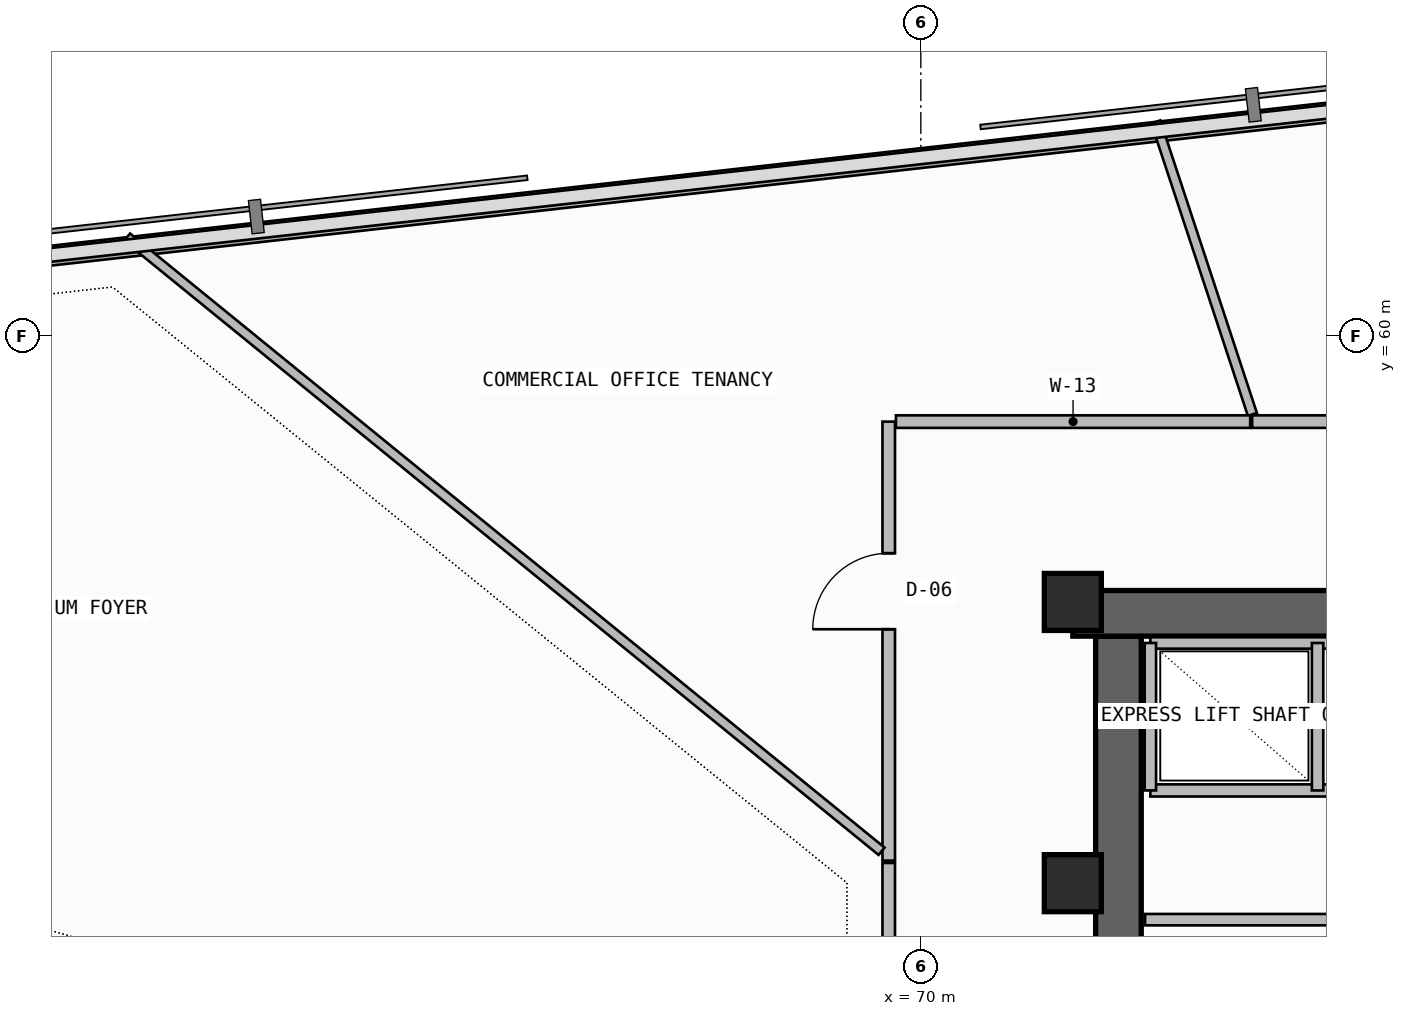
"""IFC4 building model, lengths in metres.
Left out: names, types, materials, properties, quantities, classifications, styles, units other than length and angle.
Written with IfcOpenShell. Run it as: python <this file> out.ifc"""

import sys

from ifc_helpers import new_model, si_unit, direction, frame, frame_2d, origin, origin_2d, place, context, subcontext, project, spatial, rectangle, extrude, element, fill, save


model = new_model("IFC4")
c1 = context("Model", 3, precision=1e-05, world=origin(), true_north=direction((0.0, 1.0)))
c2 = subcontext(c1, "Body", "Model", "MODEL_VIEW")
j1 = project(units=[si_unit("LENGTHUNIT", "METRE"), si_unit("PLANEANGLEUNIT", "RADIAN")], contexts=[c1])
p1 = place(None, origin())
s1 = spatial("IfcSite", under=j1, at=p1, CompositionType="ELEMENT")
p2 = place(p1, origin())
s2 = spatial("IfcBuilding", under=s1, at=p2, CompositionType="ELEMENT")
p3 = place(p2, frame((0.0, 0.0, 281.86)))
s3 = spatial("IfcBuildingStorey", under=s2, at=p3, CompositionType="ELEMENT", Elevation=281.86)
p4 = place(p3, frame((72.6, 43.35, -0.26), z_axis=(0.0, 0.0, 1.0), x_axis=(0.0, 1.0, 0.0)))
e1 = element("IfcWall", 1, at=p4, inside=s3, PredefinedType="SHEAR", context=c2, shape_type="SweptSolid", body=[
    extrude(rectangle(XDim=12.7, YDim=0.6, at=frame_2d((6.35, 0.0))), origin(), (0.0, 0.0, 1.0), 3.52),
])
p5 = place(p4, frame((1.35, 0.0, 0.26)))
e2 = element("IfcOpeningElement", 2, at=p5, cuts=e1, PredefinedType="OPENING", context=c2, shape_type="SweptSolid", body=[
    extrude(rectangle(XDim=1.2, YDim=2.2, at=frame_2d((0.6, 1.1))), frame((0.0, 0.31, 0.0), z_axis=(0.0, -1.0, 0.0), x_axis=(1.0, 0.0, 0.0)), (0.0, 0.0, 1.0), 0.62),
])
p6 = place(p3, frame((72.0, 56.35, -0.26), z_axis=(0.0, 0.0, 1.0), x_axis=(1.0, 0.0, 0.0)))
e3 = element("IfcWall", 3, at=p6, inside=s3, PredefinedType="SHEAR", context=c2, shape_type="SweptSolid", body=[
    extrude(rectangle(XDim=13.6, YDim=0.6, at=frame_2d((6.8, 0.0))), origin(), (0.0, 0.0, 1.0), 3.52),
])
for number, where, z_axis, x_axis in (
    (4, (72.0, 52.8, 0.0), (0.0, 0.0, 1.0), (1.0, 0.0, 0.0)),
    (5, (72.0, 56.5, 0.0), (0.0, 0.0, 1.0), (1.0, 0.0, 0.0)),
):
    element("IfcColumn", number, at=place(p3, frame(where, z_axis=z_axis, x_axis=x_axis)), inside=s3, PredefinedType="COLUMN", context=c2, shape_type="SweptSolid", body=[
        extrude(rectangle(XDim=0.75, YDim=0.75, at=origin_2d()), origin(), (0.0, 0.0, 1.0), 3.52),
    ])
p7 = place(p3, frame((54.805, 53.812, -0.26), z_axis=(0.0, 0.0, 1.0), x_axis=(0.678803115619, -0.734320318543, 0.0)))
e6 = element("IfcWall", 6, at=p7, inside=s3, PredefinedType="SHEAR", context=c2, shape_type="SweptSolid", body=[
    extrude(rectangle(XDim=18.083, YDim=0.55, at=frame_2d((9.042, 0.0))), origin(), (0.0, 0.0, 1.0), 3.52),
])
p8 = place(p7, frame((7.434, 0.0, 1.1)))
e7 = element("IfcOpeningElement", 7, at=p8, cuts=e6, PredefinedType="OPENING", context=c2, shape_type="SweptSolid", body=[
    extrude(rectangle(XDim=2.4, YDim=1.2, at=frame_2d((1.2, 0.6))), frame((0.0, 0.285, 0.0), z_axis=(0.0, -1.0, 0.0), x_axis=(1.0, 0.0, 0.0)), (0.0, 0.0, 1.0), 0.57),
])
p9 = place(p3, frame((81.557, 63.604, 0.0), z_axis=(0.0, 0.0, 1.0), x_axis=(-0.993776455024, -0.111392806945, 0.0)))
e8 = element("IfcWall", 8, at=p9, inside=s3, PredefinedType="PARAPET", context=c2, shape_type="SweptSolid", body=[
    extrude(rectangle(XDim=24.891, YDim=0.2, at=frame_2d((12.446, 0.0))), origin(), (0.0, 0.0, 1.0), 1.15),
])
p10 = place(p3, frame((72.95, 52.32, 0.0), z_axis=(0.0, 0.0, 1.0), x_axis=(1.0, 0.0, 0.0)))
e9 = element("IfcWall", 9, at=p10, inside=s3, PredefinedType="SOLIDWALL", context=c2, shape_type="SweptSolid", body=[
    extrude(rectangle(XDim=3.33, YDim=0.15, at=frame_2d((1.665, 0.0))), origin(), (0.0, 0.0, 1.0), 3.26),
])
p11 = place(p3, frame((73.02, 54.02, 0.0), z_axis=(0.0, 0.0, 1.0), x_axis=(1.0, 0.0, 0.0)))
e10 = element("IfcWall", 10, at=p11, inside=s3, PredefinedType="SOLIDWALL", context=c2, shape_type="SweptSolid", body=[
    extrude(rectangle(XDim=12.08, YDim=0.16, at=frame_2d((6.04, 0.0))), origin(), (0.0, 0.0, 1.0), 3.26),
])
p12 = place(p11, frame((4.03, 0.0, 0.0)))
e11 = element("IfcOpeningElement", 11, at=p12, cuts=e10, PredefinedType="OPENING", context=c2, shape_type="SweptSolid", body=[
    extrude(rectangle(XDim=1.1, YDim=2.25, at=frame_2d((0.55, 1.125))), frame((0.0, 0.09, 0.0), z_axis=(0.0, -1.0, 0.0), x_axis=(1.0, 0.0, 0.0)), (0.0, 0.0, 1.0), 0.18),
])
p13 = place(p11, frame((6.28, 0.0, 0.0)))
e12 = element("IfcOpeningElement", 12, at=p13, cuts=e10, PredefinedType="OPENING", context=c2, shape_type="SweptSolid", body=[
    extrude(rectangle(XDim=1.1, YDim=2.25, at=frame_2d((0.55, 1.125))), frame((0.0, 0.09, 0.0), z_axis=(0.0, -1.0, 0.0), x_axis=(1.0, 0.0, 0.0)), (0.0, 0.0, 1.0), 0.18),
])
p14 = place(p11, frame((8.53, 0.0, 0.0)))
e13 = element("IfcOpeningElement", 13, at=p14, cuts=e10, PredefinedType="OPENING", context=c2, shape_type="SweptSolid", body=[
    extrude(rectangle(XDim=1.1, YDim=2.25, at=frame_2d((0.55, 1.125))), frame((0.0, 0.09, 0.0), z_axis=(0.0, -1.0, 0.0), x_axis=(1.0, 0.0, 0.0)), (0.0, 0.0, 1.0), 0.18),
])
p15 = place(p3, frame((73.02, 55.96, 0.0), z_axis=(0.0, 0.0, 1.0), x_axis=(1.0, 0.0, 0.0)))
e14 = element("IfcWall", 14, at=p15, inside=s3, PredefinedType="SOLIDWALL", context=c2, shape_type="SweptSolid", body=[
    extrude(rectangle(XDim=3.5, YDim=0.15, at=frame_2d((1.75, 0.0))), origin(), (0.0, 0.0, 1.0), 3.26),
])
for number, where, z_axis, x_axis in (
    (15, (73.02, 54.02, 0.0), (0.0, 0.0, 1.0), (0.0, 1.0, 0.0)),
    (16, (75.22, 54.02, 0.0), (0.0, 0.0, 1.0), (0.0, 1.0, 0.0)),
):
    element("IfcWall", number, at=place(p3, frame(where, z_axis=z_axis, x_axis=x_axis)), inside=s3, PredefinedType="PLUMBINGWALL", context=c2, shape_type="SweptSolid", body=[
        extrude(rectangle(XDim=1.94, YDim=0.15, at=frame_2d((0.97, 0.0))), origin(), (0.0, 0.0, 1.0), 3.26),
    ])
p16 = place(p3, frame((77.256, 58.872, 0.0), z_axis=(0.0, 0.0, 1.0), x_axis=(-1.0, 0.0, 0.0)))
e17 = element("IfcWall", 17, at=p16, inside=s3, PredefinedType="PARTITIONING", context=c2, shape_type="SweptSolid", body=[
    extrude(rectangle(XDim=2.897, YDim=0.165, at=frame_2d((1.448, 0.0))), origin(), (0.0, 0.0, 1.0), 3.26),
])
p17 = place(p3, frame((74.362, 58.967, 0.0), z_axis=(0.0, 0.0, 1.0), x_axis=(-0.313552340659, 0.949570918714, 0.0)))
e18 = element("IfcWall", 18, at=p17, inside=s3, PredefinedType="PARTITIONING", context=c2, shape_type="SweptSolid", body=[
    extrude(rectangle(XDim=4.053, YDim=0.125, at=frame_2d((2.027, 0.0))), origin(), (0.0, 0.0, 1.0), 3.26),
])
p18 = place(p3, frame((69.578, 58.872, 0.0), z_axis=(0.0, 0.0, 1.0), x_axis=(0.0, -1.0, 0.0)))
e19 = element("IfcWall", 19, at=p18, inside=s3, PredefinedType="PARTITIONING", context=c2, shape_type="SweptSolid", body=[
    extrude(rectangle(XDim=5.776, YDim=0.165, at=frame_2d((2.888, 0.0))), origin(), (0.0, 0.0, 1.0), 2.745),
])
p19 = place(p18, frame((1.731, 0.0, 0.0)))
e20 = element("IfcOpeningElement", 20, at=p19, cuts=e19, PredefinedType="OPENING", context=c2, shape_type="SweptSolid", body=[
    extrude(rectangle(XDim=1.0, YDim=2.2, at=frame_2d((0.5, 1.1))), frame((0.0, 0.093, 0.0), z_axis=(0.0, -1.0, 0.0), x_axis=(1.0, 0.0, 0.0)), (0.0, 0.0, 1.0), 0.185),
])
p20 = place(p3, frame((74.333, 58.872, 0.0), z_axis=(0.0, 0.0, 1.0), x_axis=(-1.0, 0.0, 0.0)))
e21 = element("IfcWall", 21, at=p20, inside=s3, PredefinedType="PARTITIONING", context=c2, shape_type="SweptSolid", body=[
    extrude(rectangle(XDim=4.661, YDim=0.165, at=frame_2d((2.331, 0.0))), origin(), (0.0, 0.0, 1.0), 3.26),
])
p21 = place(p3, frame((69.483, 53.22, 0.0), z_axis=(0.0, 0.0, 1.0), x_axis=(-0.775619555182, 0.631200685693, 0.0)))
e22 = element("IfcWall", 22, at=p21, inside=s3, PredefinedType="PARTITIONING", context=c2, shape_type="SweptSolid", body=[
    extrude(rectangle(XDim=12.799, YDim=0.125, at=frame_2d((6.399, 0.0))), origin(), (0.0, 0.0, 1.0), 2.745),
])
p22 = place(p3, frame((69.578, 53.066, 0.0), z_axis=(0.0, 0.0, 1.0), x_axis=(0.0, -1.0, 0.0)))
e23 = element("IfcWall", 23, at=p22, inside=s3, PredefinedType="PARTITIONING", context=c2, shape_type="SweptSolid", body=[
    extrude(rectangle(XDim=4.724, YDim=0.165, at=frame_2d((2.362, 0.0))), origin(), (0.0, 0.0, 1.0), 2.745),
])
p23 = place(p22, frame((1.862, 0.0, 0.0)))
e24 = element("IfcOpeningElement", 24, at=p23, cuts=e23, PredefinedType="OPENING", context=c2, shape_type="SweptSolid", body=[
    extrude(rectangle(XDim=1.0, YDim=2.2, at=frame_2d((0.5, 1.1))), frame((0.0, 0.093, 0.0), z_axis=(0.0, -1.0, 0.0), x_axis=(1.0, 0.0, 0.0)), (0.0, 0.0, 1.0), 0.185),
])
p24 = place(p3, frame((69.483, 48.407, 0.0), z_axis=(0.0, 0.0, 1.0), x_axis=(-0.960799062269, 0.277245670738, 0.0)))
e25 = element("IfcWall", 25, at=p24, inside=s3, PredefinedType="PARTITIONING", context=c2, shape_type="SweptSolid", body=[
    extrude(rectangle(XDim=14.274, YDim=0.145, at=frame_2d((7.137, 0.0))), origin(), (0.0, 0.0, 1.0), 2.645),
])
p25 = place(p19, frame((1.0, 0.0, 0.0), z_axis=(0.0, 0.0, 1.0), x_axis=(-1.0, 0.0, 0.0)))
e26 = element("IfcDoor", 26, at=p25, inside=s3, OperationType="SINGLE_SWING_LEFT", PredefinedType="DOOR", context=c2, shape_type="SweptSolid", body=[
    extrude(rectangle(XDim=1.0, YDim=2.2, at=frame_2d((0.5, 1.1))), frame((0.0, 0.025, 0.0), z_axis=(0.0, -1.0, 0.0), x_axis=(1.0, 0.0, 0.0)), (0.0, 0.0, 1.0), 0.05),
])
fill(e20, e26)
save(model, sys.argv[1])
